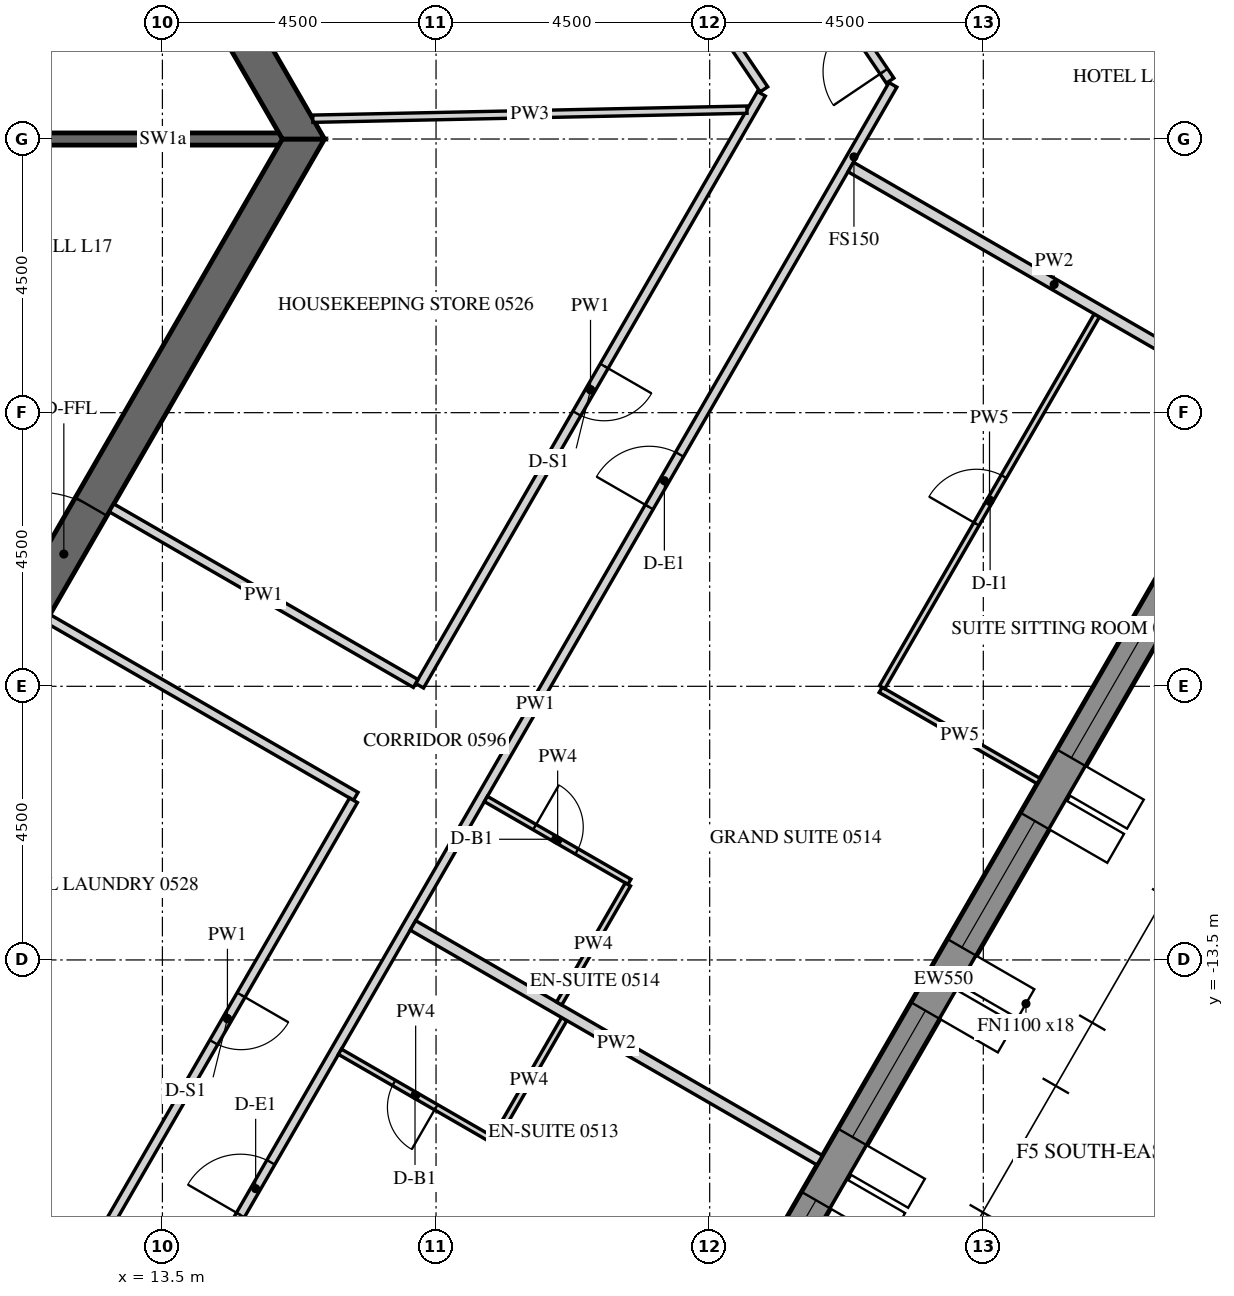
"""IFC4 building model, lengths in metres.
Left out: names, types, materials, properties, quantities, classifications, styles, units other than length and angle.
Written with IfcOpenShell. Run it as: python <this file> out.ifc"""

import sys

from ifc_helpers import new_model, si_unit, direction, frame, frame_2d, origin, place, context, subcontext, project, spatial, polyline, rectangle, outline, extrude, element, fill, save


model = new_model("IFC4")
c1 = context("Model", 3, precision=1e-05, world=origin(), true_north=direction((0.0, 1.0)))
c2 = subcontext(c1, "Body", "Model", "MODEL_VIEW")
j1 = project(units=[si_unit("LENGTHUNIT", "METRE"), si_unit("PLANEANGLEUNIT", "RADIAN")], contexts=[c1])
p1 = place(None, origin())
s1 = spatial("IfcSite", under=j1, at=p1, CompositionType="ELEMENT")
p2 = place(p1, origin())
s2 = spatial("IfcBuilding", under=s1, at=p2, CompositionType="ELEMENT")
p3 = place(p2, frame((0.0, 0.0, 80.4)))
s3 = spatial("IfcBuildingStorey", under=s2, at=p3, CompositionType="ELEMENT", Elevation=80.4)
p4 = place(p3, frame((18.83, -26.835, -0.15), z_axis=(0.0, 0.0, 1.0), x_axis=(0.500003800416, 0.866023209602, 0.0)))
e1 = element("IfcWall", 1, at=p4, inside=s3, PredefinedType="SOLIDWALL", context=c2, shape_type="SweptSolid", body=[
    extrude(outline(polyline([(-0.022, -0.275), (30.097, -0.275), (30.045, 0.275), (0.022, 0.275), (-0.022, -0.275)])), origin(), (0.0, 0.0, 1.0), 3.9),
])
p5 = place(p4, frame((1.236, 0.0, 1.05)))
e2 = element("IfcOpeningElement", 2, at=p5, cuts=e1, PredefinedType="OPENING", context=c2, shape_type="SweptSolid", body=[
    extrude(rectangle(XDim=2.4, YDim=2.4, at=frame_2d((1.2, 1.2))), frame((0.0, 0.285, 0.0), z_axis=(0.0, -1.0, 0.0), x_axis=(1.0, 0.0, 0.0)), (0.0, 0.0, 1.0), 0.57),
])
p6 = place(p4, frame((4.835, 0.0, 1.05)))
e3 = element("IfcOpeningElement", 3, at=p6, cuts=e1, PredefinedType="OPENING", context=c2, shape_type="SweptSolid", body=[
    extrude(rectangle(XDim=2.4, YDim=2.4, at=frame_2d((1.2, 1.2))), frame((0.0, 0.285, 0.0), z_axis=(0.0, -1.0, 0.0), x_axis=(1.0, 0.0, 0.0)), (0.0, 0.0, 1.0), 0.57),
])
p7 = place(p4, frame((8.436, 0.0, 1.05)))
e4 = element("IfcOpeningElement", 4, at=p7, cuts=e1, PredefinedType="OPENING", context=c2, shape_type="SweptSolid", body=[
    extrude(rectangle(XDim=2.4, YDim=2.4, at=frame_2d((1.2, 1.2))), frame((0.0, 0.285, 0.0), z_axis=(0.0, -1.0, 0.0), x_axis=(1.0, 0.0, 0.0)), (0.0, 0.0, 1.0), 0.57),
])
p8 = place(p4, frame((12.035, 0.0, 1.05)))
e5 = element("IfcOpeningElement", 5, at=p8, cuts=e1, PredefinedType="OPENING", context=c2, shape_type="SweptSolid", body=[
    extrude(rectangle(XDim=2.4, YDim=2.4, at=frame_2d((1.2, 1.2))), frame((0.0, 0.285, 0.0), z_axis=(0.0, -1.0, 0.0), x_axis=(1.0, 0.0, 0.0)), (0.0, 0.0, 1.0), 0.57),
])
p9 = place(p4, frame((15.635, 0.0, 1.05)))
e6 = element("IfcOpeningElement", 6, at=p9, cuts=e1, PredefinedType="OPENING", context=c2, shape_type="SweptSolid", body=[
    extrude(rectangle(XDim=2.4, YDim=2.4, at=frame_2d((1.2, 1.2))), frame((0.0, 0.285, 0.0), z_axis=(0.0, -1.0, 0.0), x_axis=(1.0, 0.0, 0.0)), (0.0, 0.0, 1.0), 0.57),
])
p10 = place(p4, frame((19.236, 0.0, 1.05)))
e7 = element("IfcOpeningElement", 7, at=p10, cuts=e1, PredefinedType="OPENING", context=c2, shape_type="SweptSolid", body=[
    extrude(rectangle(XDim=2.4, YDim=2.4, at=frame_2d((1.2, 1.2))), frame((0.0, 0.285, 0.0), z_axis=(0.0, -1.0, 0.0), x_axis=(1.0, 0.0, 0.0)), (0.0, 0.0, 1.0), 0.57),
])
p11 = place(p4, frame((22.835, 0.0, 1.05)))
e8 = element("IfcOpeningElement", 8, at=p11, cuts=e1, PredefinedType="OPENING", context=c2, shape_type="SweptSolid", body=[
    extrude(rectangle(XDim=2.4, YDim=2.4, at=frame_2d((1.2, 1.2))), frame((0.0, 0.285, 0.0), z_axis=(0.0, -1.0, 0.0), x_axis=(1.0, 0.0, 0.0)), (0.0, 0.0, 1.0), 0.57),
])
p12 = place(p4, frame((26.436, 0.0, 1.05)))
e9 = element("IfcOpeningElement", 9, at=p12, cuts=e1, PredefinedType="OPENING", context=c2, shape_type="SweptSolid", body=[
    extrude(rectangle(XDim=2.4, YDim=2.4, at=frame_2d((1.2, 1.2))), frame((0.0, 0.285, 0.0), z_axis=(0.0, -1.0, 0.0), x_axis=(1.0, 0.0, 0.0)), (0.0, 0.0, 1.0), 0.57),
])
p13 = place(p3, frame((7.91, -13.7, -0.15), z_axis=(0.0, 0.0, 1.0), x_axis=(0.499999880136, 0.866025472988, 0.0)))
e10 = element("IfcWall", 10, at=p13, inside=s3, PredefinedType="SHEAR", context=c2, shape_type="SweptSolid", body=[
    extrude(outline(polyline([(-0.173, -0.3), (15.993, -0.3), (15.646, 0.3), (0.173, 0.3), (-0.173, -0.3)])), origin(), (0.0, 0.0, 1.0), 3.9),
])
p14 = place(p13, frame((7.039, 0.0, 0.15)))
e11 = element("IfcOpeningElement", 11, at=p14, cuts=e10, PredefinedType="OPENING", context=c2, shape_type="SweptSolid", body=[
    extrude(rectangle(XDim=1.8, YDim=2.4, at=frame_2d((0.9, 1.2))), frame((0.0, 0.31, 0.0), z_axis=(0.0, -1.0, 0.0), x_axis=(1.0, 0.0, 0.0)), (0.0, 0.0, 1.0), 0.62),
])
p15 = place(p3, frame((15.819, 0.0, -0.15), z_axis=(0.0, 0.0, 1.0), x_axis=(-0.499999880136, 0.866025472988, 0.0)))
e12 = element("IfcWall", 12, at=p15, inside=s3, PredefinedType="SHEAR", context=c2, shape_type="SweptSolid", body=[
    extrude(outline(polyline([(-0.173, -0.3), (15.993, -0.3), (15.646, 0.3), (0.173, 0.3), (-0.173, -0.3)])), origin(), (0.0, 0.0, 1.0), 3.9),
])
p16 = place(p15, frame((6.981, 0.0, 0.15)))
e13 = element("IfcOpeningElement", 13, at=p16, cuts=e12, PredefinedType="OPENING", context=c2, shape_type="SweptSolid", body=[
    extrude(rectangle(XDim=1.8, YDim=2.4, at=frame_2d((0.9, 1.2))), frame((0.0, 0.31, 0.0), z_axis=(0.0, -1.0, 0.0), x_axis=(1.0, 0.0, 0.0)), (0.0, 0.0, 1.0), 0.62),
])
p17 = place(p3, frame((8.083, -14.0, -0.15), z_axis=(0.0, 0.0, 1.0), x_axis=(0.499997680643, -0.866026742862, 0.0)))
e14 = element("IfcWall", 14, at=p17, inside=s3, PredefinedType="SHEAR", context=c2, shape_type="SweptSolid", body=[
    extrude(rectangle(XDim=16.509, YDim=0.6, at=frame_2d((8.254, 0.0))), origin(), (0.0, 0.0, 1.0), 3.9),
])
p18 = place(p17, frame((7.354, 0.0, 0.15)))
e15 = element("IfcOpeningElement", 15, at=p18, cuts=e14, PredefinedType="OPENING", context=c2, shape_type="SweptSolid", body=[
    extrude(rectangle(XDim=1.8, YDim=2.4, at=frame_2d((0.9, 1.2))), frame((0.0, 0.31, 0.0), z_axis=(0.0, -1.0, 0.0), x_axis=(1.0, 0.0, 0.0)), (0.0, 0.0, 1.0), 0.62),
])
p19 = place(p3, frame((11.547, 0.0, -0.15), z_axis=(0.0, 0.0, 1.0), x_axis=(1.0, 0.0, 0.0)))
e16 = element("IfcWall", 16, at=p19, inside=s3, PredefinedType="SHEAR", context=c2, shape_type="SweptSolid", body=[
    extrude(rectangle(XDim=3.926, YDim=0.2, at=frame_2d((1.963, 0.0))), origin(), (0.0, 0.0, 1.0), 3.9),
])
p20 = place(p3, frame((13.755, -19.475, 0.0), z_axis=(0.0, 0.0, 1.0), x_axis=(0.50000013933, 0.866025323342, 0.0)))
e17 = element("IfcWall", 17, at=p20, inside=s3, PredefinedType="PARTITIONING", context=c2, shape_type="SweptSolid", body=[
    extrude(rectangle(XDim=23.517, YDim=0.15, at=frame_2d((11.758, 0.0))), origin(), (0.0, 0.0, 1.0), 2.988),
])
p21 = place(p20, frame((2.056, 0.0, 0.0)))
e18 = element("IfcOpeningElement", 18, at=p21, cuts=e17, PredefinedType="OPENING", context=c2, shape_type="SweptSolid", body=[
    extrude(rectangle(XDim=1.0, YDim=2.1, at=frame_2d((0.5, 1.05))), frame((0.0, 0.085, 0.0), z_axis=(0.0, -1.0, 0.0), x_axis=(1.0, 0.0, 0.0)), (0.0, 0.0, 1.0), 0.17),
])
p22 = place(p20, frame((15.499, 0.0, 0.0)))
e19 = element("IfcOpeningElement", 19, at=p22, cuts=e17, PredefinedType="OPENING", context=c2, shape_type="SweptSolid", body=[
    extrude(rectangle(XDim=1.0, YDim=2.1, at=frame_2d((0.5, 1.05))), frame((0.0, 0.085, 0.0), z_axis=(0.0, -1.0, 0.0), x_axis=(1.0, 0.0, 0.0)), (0.0, 0.0, 1.0), 0.17),
])
p23 = place(p3, frame((25.467, 0.96, 0.0), z_axis=(0.0, 0.0, 1.0), x_axis=(-0.559192112521, 0.829038106057, 0.0)))
e20 = element("IfcWall", 20, at=p23, inside=s3, PredefinedType="PARTITIONING", context=c2, shape_type="SweptSolid", body=[
    extrude(rectangle(XDim=21.584, YDim=0.15, at=frame_2d((10.792, 0.0))), origin(), (0.0, 0.0, 1.0), 2.988),
])
p24 = place(p23, frame((0.184, 0.0, 0.0)))
e21 = element("IfcOpeningElement", 21, at=p24, cuts=e20, PredefinedType="OPENING", context=c2, shape_type="SweptSolid", body=[
    extrude(rectangle(XDim=1.0, YDim=2.1, at=frame_2d((0.5, 1.05))), frame((0.0, 0.085, 0.0), z_axis=(0.0, -1.0, 0.0), x_axis=(1.0, 0.0, 0.0)), (0.0, 0.0, 1.0), 0.17),
])
p25 = place(p23, frame((9.434, 0.0, 0.0)))
e22 = element("IfcOpeningElement", 22, at=p25, cuts=e20, PredefinedType="OPENING", context=c2, shape_type="SweptSolid", body=[
    extrude(rectangle(XDim=1.0, YDim=2.1, at=frame_2d((0.5, 1.05))), frame((0.0, 0.085, 0.0), z_axis=(0.0, -1.0, 0.0), x_axis=(1.0, 0.0, 0.0)), (0.0, 0.0, 1.0), 0.17),
])
p26 = place(p23, frame((16.951, 0.0, 0.0)))
e23 = element("IfcOpeningElement", 23, at=p26, cuts=e20, PredefinedType="OPENING", context=c2, shape_type="SweptSolid", body=[
    extrude(rectangle(XDim=1.0, YDim=2.1, at=frame_2d((0.5, 1.05))), frame((0.0, 0.085, 0.0), z_axis=(0.0, -1.0, 0.0), x_axis=(1.0, 0.0, 0.0)), (0.0, 0.0, 1.0), 0.17),
])
p27 = place(p3, frame((23.351, 0.745, 0.0), z_axis=(0.0, 0.0, 1.0), x_axis=(-0.49999316964, -0.866029347258, 0.0)))
e24 = element("IfcWall", 24, at=p27, inside=s3, PredefinedType="PARTITIONING", context=c2, shape_type="SweptSolid", body=[
    extrude(rectangle(XDim=11.241, YDim=0.15, at=frame_2d((5.621, 0.0))), origin(), (0.0, 0.0, 1.0), 2.988),
])
p28 = place(p27, frame((5.171, 0.0, 0.0)))
e25 = element("IfcOpeningElement", 25, at=p28, cuts=e24, PredefinedType="OPENING", context=c2, shape_type="SweptSolid", body=[
    extrude(rectangle(XDim=0.9, YDim=2.1, at=frame_2d((0.45, 1.05))), frame((0.0, 0.085, 0.0), z_axis=(0.0, -1.0, 0.0), x_axis=(1.0, 0.0, 0.0)), (0.0, 0.0, 1.0), 0.17),
])
p29 = place(p3, frame((17.665, -8.953, 0.0), z_axis=(0.0, 0.0, 1.0), x_axis=(-0.866025774745, 0.499999357477, 0.0)))
e26 = element("IfcWall", 26, at=p29, inside=s3, PredefinedType="PARTITIONING", context=c2, shape_type="SweptSolid", body=[
    extrude(rectangle(XDim=5.775, YDim=0.15, at=frame_2d((2.887, 0.0))), origin(), (0.0, 0.0, 1.0), 2.988),
])
p30 = place(p3, frame((17.879, 8.99, 0.0), z_axis=(0.0, 0.0, 1.0), x_axis=(0.559189565351, -0.829039824136, 0.0)))
e27 = element("IfcWall", 27, at=p30, inside=s3, PredefinedType="PARTITIONING", context=c2, shape_type="SweptSolid", body=[
    extrude(rectangle(XDim=9.859, YDim=0.15, at=frame_2d((4.929, 0.0))), origin(), (0.0, 0.0, 1.0), 2.988),
])
p31 = place(p30, frame((4.479, 0.0, 0.0)))
e28 = element("IfcOpeningElement", 28, at=p31, cuts=e27, PredefinedType="OPENING", context=c2, shape_type="SweptSolid", body=[
    extrude(rectangle(XDim=0.9, YDim=2.1, at=frame_2d((0.45, 1.05))), frame((0.0, 0.085, 0.0), z_axis=(0.0, -1.0, 0.0), x_axis=(1.0, 0.0, 0.0)), (0.0, 0.0, 1.0), 0.17),
])
p32 = place(p3, frame((11.614, -7.884, 0.0), z_axis=(0.0, 0.0, 1.0), x_axis=(0.866018092707, -0.500012662943, 0.0)))
e29 = element("IfcWall", 29, at=p32, inside=s3, PredefinedType="PARTITIONING", context=c2, shape_type="SweptSolid", body=[
    extrude(rectangle(XDim=5.85, YDim=0.15, at=frame_2d((2.925, 0.0))), origin(), (0.0, 0.0, 1.0), 2.988),
])
p33 = place(p3, frame((16.643, -10.874, 0.0), z_axis=(0.0, 0.0, 1.0), x_axis=(-0.50000192383, -0.866024293058, 0.0)))
e30 = element("IfcWall", 30, at=p33, inside=s3, PredefinedType="PARTITIONING", context=c2, shape_type="SweptSolid", body=[
    extrude(rectangle(XDim=8.293, YDim=0.15, at=frame_2d((4.146, 0.0))), origin(), (0.0, 0.0, 1.0), 2.988),
])
p34 = place(p33, frame((3.697, 0.0, 0.0)))
e31 = element("IfcOpeningElement", 31, at=p34, cuts=e30, PredefinedType="OPENING", context=c2, shape_type="SweptSolid", body=[
    extrude(rectangle(XDim=0.9, YDim=2.1, at=frame_2d((0.45, 1.05))), frame((0.0, 0.085, 0.0), z_axis=(0.0, -1.0, 0.0), x_axis=(1.0, 0.0, 0.0)), (0.0, 0.0, 1.0), 0.17),
])
p35 = place(p3, frame((20.108, -14.472, 0.0), z_axis=(0.0, 0.0, 1.0), x_axis=(-0.500015210774, -0.866016621662, 0.0)))
e32 = element("IfcWall", 32, at=p35, inside=s3, PredefinedType="PARTITIONING", context=c2, shape_type="SweptSolid", body=[
    extrude(rectangle(XDim=2.31, YDim=0.1, at=frame_2d((1.155, 0.0))), origin(), (0.0, 0.0, 1.0), 2.988),
])
p36 = place(p3, frame((18.91, -16.447, 0.0), z_axis=(0.0, 0.0, 1.0), x_axis=(-0.866018712932, 0.500011588718, 0.0)))
e33 = element("IfcWall", 33, at=p36, inside=s3, PredefinedType="PARTITIONING", context=c2, shape_type="SweptSolid", body=[
    extrude(rectangle(XDim=2.875, YDim=0.1, at=frame_2d((1.438, 0.0))), origin(), (0.0, 0.0, 1.0), 2.988),
])
p37 = place(p36, frame((1.05, 0.0, 0.0)))
e34 = element("IfcOpeningElement", 34, at=p37, cuts=e33, PredefinedType="OPENING", context=c2, shape_type="SweptSolid", body=[
    extrude(rectangle(XDim=0.8, YDim=2.1, at=frame_2d((0.4, 1.05))), frame((0.0, 0.06, 0.0), z_axis=(0.0, -1.0, 0.0), x_axis=(1.0, 0.0, 0.0)), (0.0, 0.0, 1.0), 0.12),
])
p38 = place(p3, frame((24.31, -16.794, 0.0), z_axis=(0.0, 0.0, 1.0), x_axis=(-0.866027174938, 0.499996932259, 0.0)))
e35 = element("IfcWall", 35, at=p38, inside=s3, PredefinedType="PARTITIONING", context=c2, shape_type="SweptSolid", body=[
    extrude(rectangle(XDim=7.725, YDim=0.18, at=frame_2d((3.863, 0.0))), origin(), (0.0, 0.0, 1.0), 2.988),
])
p39 = place(p3, frame((18.82, -10.853, 0.0), z_axis=(0.0, 0.0, 1.0), x_axis=(0.866073700213, -0.499916338801, 0.0)))
e36 = element("IfcWall", 36, at=p39, inside=s3, PredefinedType="PARTITIONING", context=c2, shape_type="SweptSolid", body=[
    extrude(rectangle(XDim=2.725, YDim=0.1, at=frame_2d((1.363, 0.0))), origin(), (0.0, 0.0, 1.0), 2.988),
])
p40 = place(p39, frame((0.925, 0.0, 0.0)))
e37 = element("IfcOpeningElement", 37, at=p40, cuts=e36, PredefinedType="OPENING", context=c2, shape_type="SweptSolid", body=[
    extrude(rectangle(XDim=0.8, YDim=2.1, at=frame_2d((0.4, 1.05))), frame((0.0, 0.06, 0.0), z_axis=(0.0, -1.0, 0.0), x_axis=(1.0, 0.0, 0.0)), (0.0, 0.0, 1.0), 0.12),
])
p41 = place(p3, frame((21.155, -12.259, 0.0), z_axis=(0.0, 0.0, 1.0), x_axis=(-0.49995000081, -0.866054268906, 0.0)))
e38 = element("IfcWall", 38, at=p41, inside=s3, PredefinedType="PARTITIONING", context=c2, shape_type="SweptSolid", body=[
    extrude(rectangle(XDim=2.26, YDim=0.1, at=frame_2d((1.13, 0.0))), origin(), (0.0, 0.0, 1.0), 2.988),
])
p42 = place(p3, frame((27.91, -10.559, 0.0), z_axis=(0.0, 0.0, 1.0), x_axis=(-0.866010750942, 0.50002537861, 0.0)))
e39 = element("IfcWall", 39, at=p42, inside=s3, PredefinedType="PARTITIONING", context=c2, shape_type="SweptSolid", body=[
    extrude(rectangle(XDim=3.0, YDim=0.1, at=frame_2d((1.5, 0.0))), origin(), (0.0, 0.0, 1.0), 2.988),
])
p43 = place(p3, frame((25.337, -9.015, 0.0), z_axis=(0.0, 0.0, 1.0), x_axis=(0.500010820671, 0.866019156377, 0.0)))
e40 = element("IfcWall", 40, at=p43, inside=s3, PredefinedType="PARTITIONING", context=c2, shape_type="SweptSolid", body=[
    extrude(rectangle(XDim=7.06, YDim=0.1, at=frame_2d((3.53, 0.0))), origin(), (0.0, 0.0, 1.0), 2.988),
])
p44 = place(p43, frame((3.1, 0.0, 0.0)))
e41 = element("IfcOpeningElement", 41, at=p44, cuts=e40, PredefinedType="OPENING", context=c2, shape_type="SweptSolid", body=[
    extrude(rectangle(XDim=0.9, YDim=2.1, at=frame_2d((0.45, 1.05))), frame((0.0, 0.06, 0.0), z_axis=(0.0, -1.0, 0.0), x_axis=(1.0, 0.0, 0.0)), (0.0, 0.0, 1.0), 0.12),
])
p45 = place(p3, frame((31.51, -4.323, 0.0), z_axis=(0.0, 0.0, 1.0), x_axis=(-0.866027174938, 0.499996932259, 0.0)))
e42 = element("IfcWall", 42, at=p45, inside=s3, PredefinedType="PARTITIONING", context=c2, shape_type="SweptSolid", body=[
    extrude(rectangle(XDim=7.725, YDim=0.18, at=frame_2d((3.863, 0.0))), origin(), (0.0, 0.0, 1.0), 2.988),
])
p46 = place(p3, frame((23.113, 0.483, 0.0), z_axis=(0.0, 0.0, 1.0), x_axis=(-0.999781109464, -0.020922073482, 0.0)))
e43 = element("IfcWall", 43, at=p46, inside=s3, PredefinedType="PARTITIONING", context=c2, shape_type="SweptSolid", body=[
    extrude(rectangle(XDim=7.141, YDim=0.12, at=frame_2d((3.571, 0.0))), origin(), (0.0, 0.0, 1.0), 2.988),
])
p47 = place(p7, frame((0.0, 0.205, 0.0)))
e44 = element("IfcWindow", 44, at=p47, inside=s3, PartitioningType="DOUBLE_PANEL_VERTICAL", PredefinedType="WINDOW", context=c2, shape_type="SweptSolid", body=[
    extrude(rectangle(XDim=2.4, YDim=2.4, at=frame_2d((1.2, 1.2))), frame((0.0, 0.03, 0.0), z_axis=(0.0, -1.0, 0.0), x_axis=(1.0, 0.0, 0.0)), (0.0, 0.0, 1.0), 0.06),
])
fill(e4, e44)
p48 = place(p8, frame((0.0, 0.205, 0.0)))
e45 = element("IfcWindow", 45, at=p48, inside=s3, PartitioningType="DOUBLE_PANEL_VERTICAL", PredefinedType="WINDOW", context=c2, shape_type="SweptSolid", body=[
    extrude(rectangle(XDim=2.4, YDim=2.4, at=frame_2d((1.2, 1.2))), frame((0.0, 0.03, 0.0), z_axis=(0.0, -1.0, 0.0), x_axis=(1.0, 0.0, 0.0)), (0.0, 0.0, 1.0), 0.06),
])
fill(e5, e45)
p49 = place(p9, frame((0.0, 0.205, 0.0)))
e46 = element("IfcWindow", 46, at=p49, inside=s3, PartitioningType="DOUBLE_PANEL_VERTICAL", PredefinedType="WINDOW", context=c2, shape_type="SweptSolid", body=[
    extrude(rectangle(XDim=2.4, YDim=2.4, at=frame_2d((1.2, 1.2))), frame((0.0, 0.03, 0.0), z_axis=(0.0, -1.0, 0.0), x_axis=(1.0, 0.0, 0.0)), (0.0, 0.0, 1.0), 0.06),
])
fill(e6, e46)
p50 = place(p10, frame((0.0, 0.205, 0.0)))
e47 = element("IfcWindow", 47, at=p50, inside=s3, PartitioningType="DOUBLE_PANEL_VERTICAL", PredefinedType="WINDOW", context=c2, shape_type="SweptSolid", body=[
    extrude(rectangle(XDim=2.4, YDim=2.4, at=frame_2d((1.2, 1.2))), frame((0.0, 0.03, 0.0), z_axis=(0.0, -1.0, 0.0), x_axis=(1.0, 0.0, 0.0)), (0.0, 0.0, 1.0), 0.06),
])
fill(e7, e47)
p51 = place(p14, origin())
e48 = element("IfcDoor", 48, at=p51, inside=s3, OperationType="DOUBLE_DOOR_SINGLE_SWING", PredefinedType="DOOR", context=c2, shape_type="SweptSolid", body=[
    extrude(rectangle(XDim=1.8, YDim=2.4, at=frame_2d((0.9, 1.2))), frame((0.0, 0.025, 0.0), z_axis=(0.0, -1.0, 0.0), x_axis=(1.0, 0.0, 0.0)), (0.0, 0.0, 1.0), 0.05),
])
fill(e11, e48)
p52 = place(p21, origin())
e49 = element("IfcDoor", 49, at=p52, inside=s3, OperationType="SINGLE_SWING_RIGHT", PredefinedType="DOOR", context=c2, shape_type="SweptSolid", body=[
    extrude(rectangle(XDim=1.0, YDim=2.1, at=frame_2d((0.5, 1.05))), frame((0.0, 0.025, 0.0), z_axis=(0.0, -1.0, 0.0), x_axis=(1.0, 0.0, 0.0)), (0.0, 0.0, 1.0), 0.05),
])
fill(e18, e49)
p53 = place(p37, origin())
e50 = element("IfcDoor", 50, at=p53, inside=s3, OperationType="SINGLE_SWING_LEFT", PredefinedType="DOOR", context=c2, shape_type="SweptSolid", body=[
    extrude(rectangle(XDim=0.8, YDim=2.1, at=frame_2d((0.4, 1.05))), frame((0.0, 0.025, 0.0), z_axis=(0.0, -1.0, 0.0), x_axis=(1.0, 0.0, 0.0)), (0.0, 0.0, 1.0), 0.05),
])
fill(e34, e50)
p54 = place(p22, origin())
e51 = element("IfcDoor", 51, at=p54, inside=s3, OperationType="SINGLE_SWING_LEFT", PredefinedType="DOOR", context=c2, shape_type="SweptSolid", body=[
    extrude(rectangle(XDim=1.0, YDim=2.1, at=frame_2d((0.5, 1.05))), frame((0.0, 0.025, 0.0), z_axis=(0.0, -1.0, 0.0), x_axis=(1.0, 0.0, 0.0)), (0.0, 0.0, 1.0), 0.05),
])
fill(e19, e51)
p55 = place(p40, origin())
e52 = element("IfcDoor", 52, at=p55, inside=s3, OperationType="SINGLE_SWING_RIGHT", PredefinedType="DOOR", context=c2, shape_type="SweptSolid", body=[
    extrude(rectangle(XDim=0.8, YDim=2.1, at=frame_2d((0.4, 1.05))), frame((0.0, 0.025, 0.0), z_axis=(0.0, -1.0, 0.0), x_axis=(1.0, 0.0, 0.0)), (0.0, 0.0, 1.0), 0.05),
])
fill(e37, e52)
p56 = place(p44, origin())
e53 = element("IfcDoor", 53, at=p56, inside=s3, OperationType="SINGLE_SWING_RIGHT", PredefinedType="DOOR", context=c2, shape_type="SweptSolid", body=[
    extrude(rectangle(XDim=0.9, YDim=2.1, at=frame_2d((0.45, 1.05))), frame((0.0, 0.025, 0.0), z_axis=(0.0, -1.0, 0.0), x_axis=(1.0, 0.0, 0.0)), (0.0, 0.0, 1.0), 0.05),
])
fill(e41, e53)
p57 = place(p24, origin())
e54 = element("IfcDoor", 54, at=p57, inside=s3, OperationType="SINGLE_SWING_RIGHT", PredefinedType="DOOR", context=c2, shape_type="SweptSolid", body=[
    extrude(rectangle(XDim=1.0, YDim=2.1, at=frame_2d((0.5, 1.05))), frame((0.0, 0.025, 0.0), z_axis=(0.0, -1.0, 0.0), x_axis=(1.0, 0.0, 0.0)), (0.0, 0.0, 1.0), 0.05),
])
fill(e21, e54)
p58 = place(p28, origin())
e55 = element("IfcDoor", 55, at=p58, inside=s3, OperationType="SINGLE_SWING_RIGHT", PredefinedType="DOOR", context=c2, shape_type="SweptSolid", body=[
    extrude(rectangle(XDim=0.9, YDim=2.1, at=frame_2d((0.45, 1.05))), frame((0.0, 0.025, 0.0), z_axis=(0.0, -1.0, 0.0), x_axis=(1.0, 0.0, 0.0)), (0.0, 0.0, 1.0), 0.05),
])
fill(e25, e55)
p59 = place(p34, origin())
e56 = element("IfcDoor", 56, at=p59, inside=s3, OperationType="SINGLE_SWING_RIGHT", PredefinedType="DOOR", context=c2, shape_type="SweptSolid", body=[
    extrude(rectangle(XDim=0.9, YDim=2.1, at=frame_2d((0.45, 1.05))), frame((0.0, 0.025, 0.0), z_axis=(0.0, -1.0, 0.0), x_axis=(1.0, 0.0, 0.0)), (0.0, 0.0, 1.0), 0.05),
])
fill(e31, e56)
save(model, sys.argv[1])
